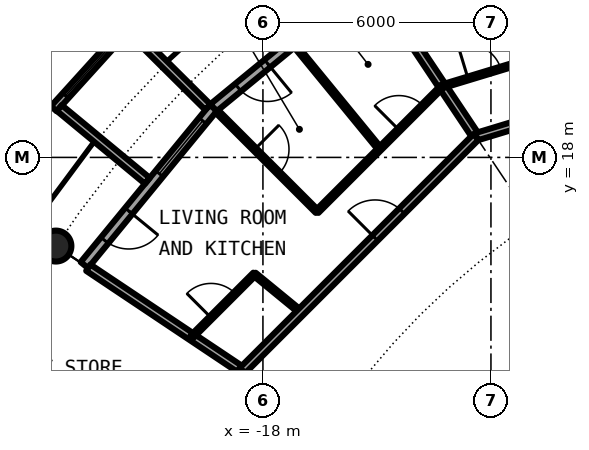
"""IFC4 building model, lengths in metres.
Left out: names, types, materials, properties, quantities, classifications, styles, units other than length and angle.
Written with IfcOpenShell. Run it as: python <this file> out.ifc"""

import sys

from ifc_helpers import new_model, si_unit, direction, frame, frame_2d, origin, origin_2d, place, context, subcontext, project, spatial, rectangle, circle, hollow_circle, extrude, element, fill, save


model = new_model("IFC4")
c1 = context("Model", 3, precision=1e-05, world=origin(), true_north=direction((0.0, 1.0)))
c2 = subcontext(c1, "Body", "Model", "MODEL_VIEW")
j1 = project(units=[si_unit("LENGTHUNIT", "METRE"), si_unit("PLANEANGLEUNIT", "RADIAN")], contexts=[c1])
p1 = place(None, origin())
s1 = spatial("IfcSite", under=j1, at=p1, CompositionType="ELEMENT")
p2 = place(p1, origin())
s2 = spatial("IfcBuilding", under=s1, at=p2, CompositionType="ELEMENT")
p3 = place(p2, frame((0.0, 0.0, 199.35)))
s3 = spatial("IfcBuildingStorey", under=s2, at=p3, CompositionType="ELEMENT", Elevation=199.35)
p4 = place(p3, frame((-23.448, 15.667, 0.0), z_axis=(0.0, 0.0, 1.0), x_axis=(1.0, 0.0, 0.0)))
e1 = element("IfcColumn", 1, at=p4, inside=s3, PredefinedType="COLUMN", context=c2, shape_type="SweptSolid", body=[
    extrude(hollow_circle(Radius=0.406, WallThickness=0.03, at=origin_2d()), origin(), (0.0, 0.0, 1.0), 3.05),
])
p5 = place(p3, frame((-15.167, 22.699, 0.0), z_axis=(0.0, 0.0, 1.0), x_axis=(-0.773019449054, -0.634382322723, 0.0)))
e2 = element("IfcWall", 2, at=p5, inside=s3, PredefinedType="SOLIDWALL", context=c2, shape_type="SweptSolid", body=[
    extrude(rectangle(XDim=5.352, YDim=0.25, at=frame_2d((2.676, 0.0))), origin(), (0.0, 0.0, 1.0), 2.7),
])
p6 = place(p5, frame((0.441, 0.0, 0.3)))
e3 = element("IfcOpeningElement", 3, at=p6, cuts=e2, PredefinedType="OPENING", context=c2, shape_type="SweptSolid", body=[
    extrude(rectangle(XDim=1.8, YDim=2.1, at=frame_2d((0.9, 1.05))), frame((0.0, 0.135, 0.0), z_axis=(0.0, -1.0, 0.0), x_axis=(1.0, 0.0, 0.0)), (0.0, 0.0, 1.0), 0.27),
])
p7 = place(p5, frame((3.51, 0.0, 0.0)))
e4 = element("IfcOpeningElement", 4, at=p7, cuts=e2, PredefinedType="OPENING", context=c2, shape_type="SweptSolid", body=[
    extrude(rectangle(XDim=1.0, YDim=2.2, at=frame_2d((0.5, 1.1))), frame((0.0, 0.135, 0.0), z_axis=(0.0, -1.0, 0.0), x_axis=(1.0, 0.0, 0.0)), (0.0, 0.0, 1.0), 0.27),
])
p8 = place(p3, frame((-19.304, 19.304, 0.0), z_axis=(0.0, 0.0, 1.0), x_axis=(-0.634382322723, -0.773019449054, 0.0)))
e5 = element("IfcWall", 5, at=p8, inside=s3, PredefinedType="SOLIDWALL", context=c2, shape_type="SweptSolid", body=[
    extrude(rectangle(XDim=5.352, YDim=0.25, at=frame_2d((2.676, 0.0))), origin(), (0.0, 0.0, 1.0), 2.7),
])
p9 = place(p8, frame((0.441, 0.0, 0.3)))
e6 = element("IfcOpeningElement", 6, at=p9, cuts=e5, PredefinedType="OPENING", context=c2, shape_type="SweptSolid", body=[
    extrude(rectangle(XDim=1.8, YDim=2.1, at=frame_2d((0.9, 1.05))), frame((0.0, 0.135, 0.0), z_axis=(0.0, -1.0, 0.0), x_axis=(1.0, 0.0, 0.0)), (0.0, 0.0, 1.0), 0.27),
])
p10 = place(p8, frame((3.51, 0.0, 0.0)))
e7 = element("IfcOpeningElement", 7, at=p10, cuts=e5, PredefinedType="OPENING", context=c2, shape_type="SweptSolid", body=[
    extrude(rectangle(XDim=1.0, YDim=2.2, at=frame_2d((0.5, 1.1))), frame((0.0, 0.135, 0.0), z_axis=(0.0, -1.0, 0.0), x_axis=(1.0, 0.0, 0.0)), (0.0, 0.0, 1.0), 0.27),
])
p11 = place(p3, frame((-21.493, 21.5, -0.03), z_axis=(0.0, 0.0, 1.0), x_axis=(-0.671506829416, -0.740998365753, 0.0)))
e8 = element("IfcWall", 8, at=p11, inside=s3, PredefinedType="SOLIDWALL", context=c2, shape_type="SweptSolid", body=[
    extrude(rectangle(XDim=2.993, YDim=0.2, at=frame_2d((1.497, 0.0))), origin(), (0.0, 0.0, 1.0), 2.73),
])
p12 = place(p11, frame((0.457, 0.0, 0.33)))
e9 = element("IfcOpeningElement", 9, at=p12, cuts=e8, PredefinedType="OPENING", context=c2, shape_type="SweptSolid", body=[
    extrude(circle(Radius=1.04, at=frame_2d((1.04, 1.04))), frame((0.0, 0.11, 0.0), z_axis=(0.0, -1.0, 0.0), x_axis=(1.0, 0.0, 0.0)), (0.0, 0.0, 1.0), 0.22),
])
p13 = place(p3, frame((-19.45, 19.323, -0.03), z_axis=(0.0, 0.0, 1.0), x_axis=(-0.709727076896, 0.704476739375, 0.0)))
e10 = element("IfcWall", 10, at=p13, inside=s3, PredefinedType="SOLIDWALL", context=c2, shape_type="SweptSolid", body=[
    extrude(rectangle(XDim=2.883, YDim=0.2, at=frame_2d((1.441, 0.0))), origin(), (0.0, 0.0, 1.0), 2.73),
])
p14 = place(p3, frame((-21.041, 17.384, -0.03), z_axis=(0.0, 0.0, 1.0), x_axis=(-0.770784861449, 0.63709551667, 0.0)))
e11 = element("IfcWall", 11, at=p14, inside=s3, PredefinedType="SOLIDWALL", context=c2, shape_type="SweptSolid", body=[
    extrude(rectangle(XDim=3.006, YDim=0.2, at=frame_2d((1.503, 0.0))), origin(), (0.0, 0.0, 1.0), 2.73),
])
p15 = place(p3, frame((-18.224, 14.927, 0.0), z_axis=(0.0, 0.0, 1.0), x_axis=(0.773446828454, -0.633861186344, 0.0)))
e12 = element("IfcWall", 12, at=p15, inside=s3, PredefinedType="PARTITIONING", context=c2, shape_type="SweptSolid", body=[
    extrude(rectangle(XDim=1.578, YDim=0.1, at=frame_2d((0.789, 0.0))), origin(), (0.0, 0.0, 1.0), 2.7),
])
p16 = place(p3, frame((-22.595, 15.098, 0.0), z_axis=(0.0, 0.0, 1.0), x_axis=(0.831387096605, -0.55569370664, 0.0)))
e13 = element("IfcWall", 13, at=p16, inside=s3, PredefinedType="PARTITIONING", context=c2, shape_type="SweptSolid", body=[
    extrude(rectangle(XDim=4.875, YDim=0.2, at=frame_2d((2.438, 0.0))), origin(), (0.0, 0.0, 1.0), 2.7),
])
p17 = place(p3, frame((-19.216, 19.216, 0.0), z_axis=(0.0, 0.0, 1.0), x_axis=(0.707106781187, -0.707106781187, 0.0)))
e14 = element("IfcWall", 14, at=p17, inside=s3, PredefinedType="PARTITIONING", context=c2, shape_type="SweptSolid", body=[
    extrude(rectangle(XDim=3.735, YDim=0.1, at=frame_2d((1.868, 0.0))), origin(), (0.0, 0.0, 1.0), 2.7),
])
p18 = place(p17, frame((1.417, 0.0, 0.0)))
e15 = element("IfcOpeningElement", 15, at=p18, cuts=e14, PredefinedType="OPENING", context=c2, shape_type="SweptSolid", body=[
    extrude(rectangle(XDim=0.9, YDim=2.3, at=frame_2d((0.45, 1.15))), frame((0.0, 0.06, 0.0), z_axis=(0.0, -1.0, 0.0), x_axis=(1.0, 0.0, 0.0)), (0.0, 0.0, 1.0), 0.12),
])
p19 = place(p3, frame((-17.22, 21.023, 0.0), z_axis=(0.0, 0.0, 1.0), x_axis=(0.633737383709, -0.773548271597, 0.0)))
e16 = element("IfcWall", 16, at=p19, inside=s3, PredefinedType="PARTITIONING", context=c2, shape_type="SweptSolid", body=[
    extrude(rectangle(XDim=3.618, YDim=0.1, at=frame_2d((1.809, 0.0))), origin(), (0.0, 0.0, 1.0), 2.7),
])
p20 = place(p3, frame((-15.097, 22.596, 0.0), z_axis=(0.0, 0.0, 1.0), x_axis=(0.555462686211, -0.831541462723, 0.0)))
e17 = element("IfcWall", 17, at=p20, inside=s3, PredefinedType="PARTITIONING", context=c2, shape_type="SweptSolid", body=[
    extrude(rectangle(XDim=4.875, YDim=0.2, at=frame_2d((2.438, 0.0))), origin(), (0.0, 0.0, 1.0), 2.7),
])
p21 = place(p3, frame((-12.887, 23.925, 0.0), z_axis=(0.0, 0.0, 1.0), x_axis=(0.474281720599, -0.88037313084, 0.0)))
e18 = element("IfcWall", 18, at=p21, inside=s3, PredefinedType="PARTITIONING", context=c2, shape_type="SweptSolid", body=[
    extrude(rectangle(XDim=3.842, YDim=0.1, at=frame_2d((1.921, 0.0))), origin(), (0.0, 0.0, 1.0), 2.7),
])
p22 = place(p3, frame((-14.718, 9.832, 0.0), z_axis=(0.0, 0.0, 1.0), x_axis=(0.831437137577, 0.555618831806, 0.0)))
e19 = element("IfcWall", 19, at=p22, inside=s3, PredefinedType="PARTITIONING", context=c2, shape_type="SweptSolid", body=[
    extrude(rectangle(XDim=13.549, YDim=0.2, at=frame_2d((6.774, 0.0))), origin(), (0.0, 0.0, 1.0), 2.7),
])
p23 = place(p22, frame((7.968, 0.0, 0.0)))
e20 = element("IfcOpeningElement", 20, at=p23, cuts=e19, PredefinedType="OPENING", context=c2, shape_type="SweptSolid", body=[
    extrude(rectangle(XDim=1.0, YDim=2.3, at=frame_2d((0.5, 1.15))), frame((0.0, 0.11, 0.0), z_axis=(0.0, -1.0, 0.0), x_axis=(1.0, 0.0, 0.0)), (0.0, 0.0, 1.0), 0.22),
])
p24 = place(p3, frame((-12.389, 18.542, 0.0), z_axis=(0.0, 0.0, 1.0), x_axis=(0.956942051091, 0.290279022415, 0.0)))
e21 = element("IfcWall", 21, at=p24, inside=s3, PredefinedType="PARTITIONING", context=c2, shape_type="SweptSolid", body=[
    extrude(rectangle(XDim=12.946, YDim=0.2, at=frame_2d((6.473, 0.0))), origin(), (0.0, 0.0, 1.0), 2.7),
])
p25 = place(p24, frame((4.895, 0.0, 0.0)))
e22 = element("IfcOpeningElement", 22, at=p25, cuts=e21, PredefinedType="OPENING", context=c2, shape_type="SweptSolid", body=[
    extrude(rectangle(XDim=1.0, YDim=2.3, at=frame_2d((0.5, 1.15))), frame((0.0, 0.11, 0.0), z_axis=(0.0, -1.0, 0.0), x_axis=(1.0, 0.0, 0.0)), (0.0, 0.0, 1.0), 0.22),
])
p26 = place(p3, frame((-18.542, 12.389, 0.0), z_axis=(0.0, 0.0, 1.0), x_axis=(0.707106781187, 0.707106781187, 0.0)))
e23 = element("IfcWall", 23, at=p26, inside=s3, PredefinedType="PARTITIONING", context=c2, shape_type="SweptSolid", body=[
    extrude(rectangle(XDim=8.702, YDim=0.2, at=frame_2d((4.351, 0.0))), origin(), (0.0, 0.0, 1.0), 2.7),
])
p27 = place(p26, frame((4.938, 0.0, 0.0)))
e24 = element("IfcOpeningElement", 24, at=p27, cuts=e23, PredefinedType="OPENING", context=c2, shape_type="SweptSolid", body=[
    extrude(rectangle(XDim=1.0, YDim=2.3, at=frame_2d((0.5, 1.15))), frame((0.0, 0.11, 0.0), z_axis=(0.0, -1.0, 0.0), x_axis=(1.0, 0.0, 0.0)), (0.0, 0.0, 1.0), 0.22),
])
p28 = place(p3, frame((-19.317, 10.915, 0.0), z_axis=(0.0, 0.0, 1.0), x_axis=(0.465359652486, 0.885121683068, 0.0)))
e25 = element("IfcWall", 25, at=p28, inside=s3, PredefinedType="PARTITIONING", context=c2, shape_type="SweptSolid", body=[
    extrude(rectangle(XDim=1.665, YDim=0.2, at=frame_2d((0.833, 0.0))), origin(), (0.0, 0.0, 1.0), 2.7),
])
p29 = place(p3, frame((-13.281, 19.871, 0.0), z_axis=(0.0, 0.0, 1.0), x_axis=(0.956938868877, 0.290289512785, 0.0)))
e26 = element("IfcWall", 26, at=p29, inside=s3, PredefinedType="PARTITIONING", context=c2, shape_type="SweptSolid", body=[
    extrude(rectangle(XDim=6.941, YDim=0.1, at=frame_2d((3.47, 0.0))), origin(), (0.0, 0.0, 1.0), 2.7),
])
p30 = place(p29, frame((3.025, 0.0, 0.0)))
e27 = element("IfcOpeningElement", 27, at=p30, cuts=e26, PredefinedType="OPENING", context=c2, shape_type="SweptSolid", body=[
    extrude(rectangle(XDim=0.9, YDim=2.3, at=frame_2d((0.45, 1.15))), frame((0.0, 0.06, 0.0), z_axis=(0.0, -1.0, 0.0), x_axis=(1.0, 0.0, 0.0)), (0.0, 0.0, 1.0), 0.12),
])
p31 = place(p29, frame((0.708, 0.0, 0.0)))
e28 = element("IfcOpeningElement", 28, at=p31, cuts=e26, PredefinedType="OPENING", context=c2, shape_type="SweptSolid", body=[
    extrude(rectangle(XDim=0.9, YDim=2.3, at=frame_2d((0.45, 1.15))), frame((0.0, 0.06, 0.0), z_axis=(0.0, -1.0, 0.0), x_axis=(1.0, 0.0, 0.0)), (0.0, 0.0, 1.0), 0.12),
])
p32 = place(p3, frame((-19.867, 13.283, 0.0), z_axis=(0.0, 0.0, 1.0), x_axis=(0.707106781187, 0.707106781187, 0.0)))
e29 = element("IfcWall", 29, at=p32, inside=s3, PredefinedType="PARTITIONING", context=c2, shape_type="SweptSolid", body=[
    extrude(rectangle(XDim=2.332, YDim=0.1, at=frame_2d((1.166, 0.0))), origin(), (0.0, 0.0, 1.0), 2.7),
])
p33 = place(p32, frame((0.709, 0.0, 0.0)))
e30 = element("IfcOpeningElement", 30, at=p33, cuts=e29, PredefinedType="OPENING", context=c2, shape_type="SweptSolid", body=[
    extrude(rectangle(XDim=0.9, YDim=2.3, at=frame_2d((0.45, 1.15))), frame((0.0, 0.06, 0.0), z_axis=(0.0, -1.0, 0.0), x_axis=(1.0, 0.0, 0.0)), (0.0, 0.0, 1.0), 0.12),
])
p34 = place(p3, frame((-16.575, 16.575, 0.0), z_axis=(0.0, 0.0, 1.0), x_axis=(0.707080600289, 0.707132961115, 0.0)))
e31 = element("IfcWall", 31, at=p34, inside=s3, PredefinedType="PARTITIONING", context=c2, shape_type="SweptSolid", body=[
    extrude(rectangle(XDim=4.663, YDim=0.1, at=frame_2d((2.331, 0.0))), origin(), (0.0, 0.0, 1.0), 2.7),
])
p35 = place(p34, frame((3.043, 0.0, 0.0)))
e32 = element("IfcOpeningElement", 32, at=p35, cuts=e31, PredefinedType="OPENING", context=c2, shape_type="SweptSolid", body=[
    extrude(rectangle(XDim=0.9, YDim=2.3, at=frame_2d((0.45, 1.15))), frame((0.0, 0.06, 0.0), z_axis=(0.0, -1.0, 0.0), x_axis=(1.0, 0.0, 0.0)), (0.0, 0.0, 1.0), 0.12),
])
p36 = place(p7, origin())
e33 = element("IfcDoor", 33, at=p36, inside=s3, OperationType="SINGLE_SWING_LEFT", PredefinedType="DOOR", context=c2, shape_type="SweptSolid", body=[
    extrude(rectangle(XDim=1.0, YDim=2.2, at=frame_2d((0.5, 1.1))), frame((0.0, 0.025, 0.0), z_axis=(0.0, -1.0, 0.0), x_axis=(1.0, 0.0, 0.0)), (0.0, 0.0, 1.0), 0.05),
])
fill(e4, e33)
p37 = place(p9, origin())
e34 = element("IfcWindow", 34, at=p37, inside=s3, PartitioningType="SINGLE_PANEL", PredefinedType="WINDOW", context=c2, shape_type="SweptSolid", body=[
    extrude(rectangle(XDim=1.8, YDim=2.1, at=frame_2d((0.9, 1.05))), frame((0.0, 0.03, 0.0), z_axis=(0.0, -1.0, 0.0), x_axis=(1.0, 0.0, 0.0)), (0.0, 0.0, 1.0), 0.06),
])
fill(e6, e34)
p38 = place(p12, origin())
e35 = element("IfcWindow", 35, at=p38, inside=s3, PartitioningType="SINGLE_PANEL", PredefinedType="WINDOW", context=c2, shape_type="SweptSolid", body=[
    extrude(circle(Radius=1.04, at=frame_2d((1.04, 1.04))), frame((0.0, 0.03, 0.0), z_axis=(0.0, -1.0, 0.0), x_axis=(1.0, 0.0, 0.0)), (0.0, 0.0, 1.0), 0.06),
])
fill(e9, e35)
p39 = place(p10, origin())
e36 = element("IfcDoor", 36, at=p39, inside=s3, OperationType="SINGLE_SWING_LEFT", PredefinedType="DOOR", context=c2, shape_type="SweptSolid", body=[
    extrude(rectangle(XDim=1.0, YDim=2.2, at=frame_2d((0.5, 1.1))), frame((0.0, 0.025, 0.0), z_axis=(0.0, -1.0, 0.0), x_axis=(1.0, 0.0, 0.0)), (0.0, 0.0, 1.0), 0.05),
])
fill(e7, e36)
p40 = place(p31, origin())
e37 = element("IfcDoor", 37, at=p40, inside=s3, OperationType="SINGLE_SWING_LEFT", PredefinedType="DOOR", context=c2, shape_type="SweptSolid", body=[
    extrude(rectangle(XDim=0.9, YDim=2.3, at=frame_2d((0.45, 1.15))), frame((0.0, 0.025, 0.0), z_axis=(0.0, -1.0, 0.0), x_axis=(1.0, 0.0, 0.0)), (0.0, 0.0, 1.0), 0.05),
])
fill(e28, e37)
p41 = place(p27, origin())
e38 = element("IfcDoor", 38, at=p41, inside=s3, OperationType="SINGLE_SWING_RIGHT", PredefinedType="DOOR", context=c2, shape_type="SweptSolid", body=[
    extrude(rectangle(XDim=1.0, YDim=2.3, at=frame_2d((0.5, 1.15))), frame((0.0, 0.025, 0.0), z_axis=(0.0, -1.0, 0.0), x_axis=(1.0, 0.0, 0.0)), (0.0, 0.0, 1.0), 0.05),
])
fill(e24, e38)
p42 = place(p33, origin())
e39 = element("IfcDoor", 39, at=p42, inside=s3, OperationType="SINGLE_SWING_LEFT", PredefinedType="DOOR", context=c2, shape_type="SweptSolid", body=[
    extrude(rectangle(XDim=0.9, YDim=2.3, at=frame_2d((0.45, 1.15))), frame((0.0, 0.025, 0.0), z_axis=(0.0, -1.0, 0.0), x_axis=(1.0, 0.0, 0.0)), (0.0, 0.0, 1.0), 0.05),
])
fill(e30, e39)
p43 = place(p18, origin())
e40 = element("IfcDoor", 40, at=p43, inside=s3, OperationType="SINGLE_SWING_LEFT", PredefinedType="DOOR", context=c2, shape_type="SweptSolid", body=[
    extrude(rectangle(XDim=0.9, YDim=2.3, at=frame_2d((0.45, 1.15))), frame((0.0, 0.025, 0.0), z_axis=(0.0, -1.0, 0.0), x_axis=(1.0, 0.0, 0.0)), (0.0, 0.0, 1.0), 0.05),
])
fill(e15, e40)
p44 = place(p35, origin())
e41 = element("IfcDoor", 41, at=p44, inside=s3, OperationType="SINGLE_SWING_RIGHT", PredefinedType="DOOR", context=c2, shape_type="SweptSolid", body=[
    extrude(rectangle(XDim=0.9, YDim=2.3, at=frame_2d((0.45, 1.15))), frame((0.0, 0.025, 0.0), z_axis=(0.0, -1.0, 0.0), x_axis=(1.0, 0.0, 0.0)), (0.0, 0.0, 1.0), 0.05),
])
fill(e32, e41)
save(model, sys.argv[1])
